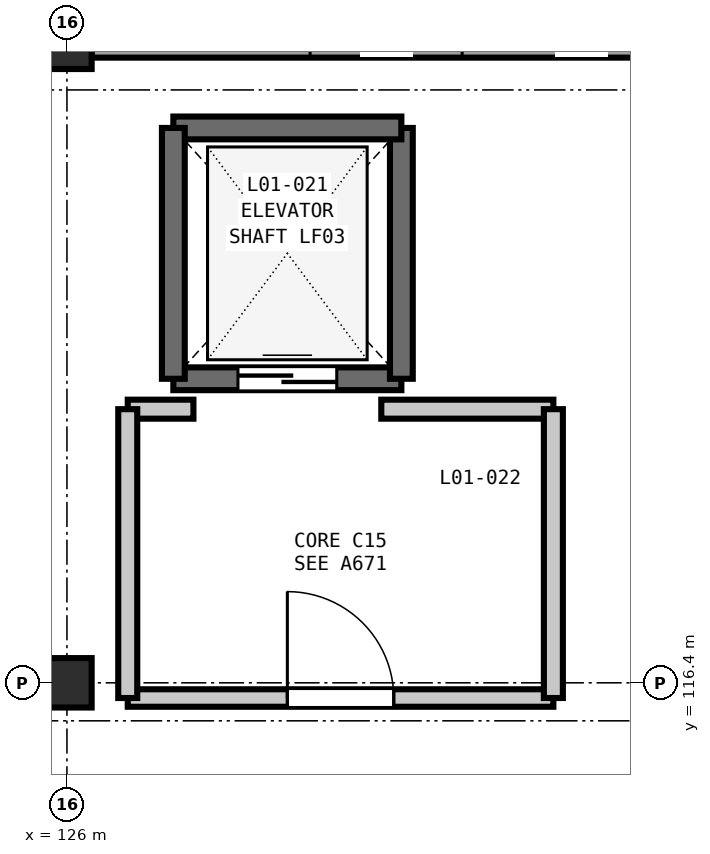
"""IFC4 building model, lengths in metres.
Left out: names, types, materials, properties, quantities, classifications, styles, units other than length and angle.
Written with IfcOpenShell. Run it as: python <this file> out.ifc"""

import sys

from ifc_helpers import new_model, si_unit, direction, frame, frame_2d, origin, origin_2d, place, context, subcontext, project, spatial, rectangle, extrude, element, fill, save


model = new_model("IFC4")
c1 = context("Model", 3, precision=1e-05, world=origin(), true_north=direction((0.0, 1.0)))
c2 = subcontext(c1, "Body", "Model", "MODEL_VIEW")
j1 = project(units=[si_unit("LENGTHUNIT", "METRE"), si_unit("PLANEANGLEUNIT", "RADIAN")], contexts=[c1])
p1 = place(None, origin())
s1 = spatial("IfcSite", under=j1, at=p1, CompositionType="ELEMENT")
p2 = place(p1, origin())
s2 = spatial("IfcBuilding", under=s1, at=p2, CompositionType="ELEMENT")
p3 = place(p2, frame((0.0, 0.0, 5.4)))
s3 = spatial("IfcBuildingStorey", under=s2, at=p3, CompositionType="ELEMENT", Elevation=5.4)
for number, where, z_axis, x_axis in (
    (1, (126.0, 116.4, 0.0), (0.0, 0.0, 1.0), (1.0, 0.0, 0.0)),
    (2, (126.0, 124.8, 0.0), (0.0, 0.0, 1.0), (1.0, 0.0, 0.0)),
):
    element("IfcColumn", number, at=place(p3, frame(where, z_axis=z_axis, x_axis=x_axis)), inside=s3, PredefinedType="COLUMN", context=c2, shape_type="SweptSolid", body=[
        extrude(rectangle(XDim=0.65, YDim=0.65, at=origin_2d()), origin(), (0.0, 0.0, 1.0), 5.4),
    ])
p4 = place(p3, frame((126.323, 124.8, 0.0), z_axis=(0.0, 0.0, 1.0), x_axis=(1.0, 0.0, 0.0)))
e3 = element("IfcWall", 3, at=p4, inside=s3, PredefinedType="SOLIDWALL", context=c2, shape_type="SweptSolid", body=[
    extrude(rectangle(XDim=7.754, YDim=0.35, at=frame_2d((3.877, 0.0))), origin(), (0.0, 0.0, 1.0), 4.68),
])
p5 = place(p4, frame((2.877, 0.0, 0.9)))
e4 = element("IfcOpeningElement", 4, at=p5, cuts=e3, PredefinedType="OPENING", context=c2, shape_type="SweptSolid", body=[
    extrude(rectangle(XDim=2.0, YDim=1.95, at=frame_2d((1.0, 0.975))), frame((0.0, 0.185, 0.0), z_axis=(0.0, -1.0, 0.0), x_axis=(1.0, 0.0, 0.0)), (0.0, 0.0, 1.0), 0.37),
])
p6 = place(p3, frame((127.4, 120.4, 0.0), z_axis=(0.0, 0.0, 1.0), x_axis=(1.0, 0.0, 0.0)))
e5 = element("IfcWall", 5, at=p6, inside=s3, PredefinedType="SHEAR", context=c2, shape_type="SweptSolid", body=[
    extrude(rectangle(XDim=3.0, YDim=0.3, at=frame_2d((1.5, 0.0))), origin(), (0.0, 0.0, 1.0), 5.4),
])
p7 = place(p6, frame((0.85, 0.0, 0.0)))
e6 = element("IfcOpeningElement", 6, at=p7, cuts=e5, PredefinedType="OPENING", context=c2, shape_type="SweptSolid", body=[
    extrude(rectangle(XDim=1.3, YDim=2.2, at=frame_2d((0.65, 1.1))), frame((0.0, 0.16, 0.0), z_axis=(0.0, -1.0, 0.0), x_axis=(1.0, 0.0, 0.0)), (0.0, 0.0, 1.0), 0.32),
])
p8 = place(p3, frame((130.4, 120.4, 0.0), z_axis=(0.0, 0.0, 1.0), x_axis=(0.0, 1.0, 0.0)))
e7 = element("IfcWall", 7, at=p8, inside=s3, PredefinedType="SHEAR", context=c2, shape_type="SweptSolid", body=[
    extrude(rectangle(XDim=3.3, YDim=0.3, at=frame_2d((1.65, 0.0))), origin(), (0.0, 0.0, 1.0), 5.4),
])
p9 = place(p3, frame((130.4, 123.7, 0.0), z_axis=(0.0, 0.0, 1.0), x_axis=(-1.0, 0.0, 0.0)))
e8 = element("IfcWall", 8, at=p9, inside=s3, PredefinedType="SHEAR", context=c2, shape_type="SweptSolid", body=[
    extrude(rectangle(XDim=3.0, YDim=0.3, at=frame_2d((1.5, 0.0))), origin(), (0.0, 0.0, 1.0), 5.4),
])
p10 = place(p3, frame((127.4, 123.7, 0.0), z_axis=(0.0, 0.0, 1.0), x_axis=(0.0, -1.0, 0.0)))
e9 = element("IfcWall", 9, at=p10, inside=s3, PredefinedType="SHEAR", context=c2, shape_type="SweptSolid", body=[
    extrude(rectangle(XDim=3.3, YDim=0.3, at=frame_2d((1.65, 0.0))), origin(), (0.0, 0.0, 1.0), 5.4),
])
p11 = place(p3, frame((126.8, 116.2, 0.0), z_axis=(0.0, 0.0, 1.0), x_axis=(1.0, 0.0, 0.0)))
e10 = element("IfcWall", 10, at=p11, inside=s3, PredefinedType="PARTITIONING", context=c2, shape_type="SweptSolid", body=[
    extrude(rectangle(XDim=5.6, YDim=0.23, at=frame_2d((2.8, 0.0))), origin(), (0.0, 0.0, 1.0), 4.685),
])
p12 = place(p11, frame((2.1, 0.0, 0.0)))
e11 = element("IfcOpeningElement", 11, at=p12, cuts=e10, PredefinedType="OPENING", context=c2, shape_type="SweptSolid", body=[
    extrude(rectangle(XDim=1.4, YDim=2.2, at=frame_2d((0.7, 1.1))), frame((0.0, 0.125, 0.0), z_axis=(0.0, -1.0, 0.0), x_axis=(1.0, 0.0, 0.0)), (0.0, 0.0, 1.0), 0.25),
])
p13 = place(p3, frame((130.136, 120.0, 0.0), z_axis=(0.0, 0.0, 1.0), x_axis=(1.0, 0.0, 0.0)))
e12 = element("IfcWall", 12, at=p13, inside=s3, PredefinedType="PARTITIONING", context=c2, shape_type="SweptSolid", body=[
    extrude(rectangle(XDim=2.264, YDim=0.25, at=frame_2d((1.132, 0.0))), origin(), (0.0, 0.0, 1.0), 5.05),
])
p14 = place(p3, frame((126.8, 120.0, 0.0), z_axis=(0.0, 0.0, 1.0), x_axis=(1.0, 0.0, 0.0)))
e13 = element("IfcWall", 13, at=p14, inside=s3, PredefinedType="PARTITIONING", context=c2, shape_type="SweptSolid", body=[
    extrude(rectangle(XDim=0.864, YDim=0.25, at=frame_2d((0.432, 0.0))), origin(), (0.0, 0.0, 1.0), 5.05),
])
for number, where, z_axis, x_axis in (
    (14, (126.8, 116.2, 0.0), (0.0, 0.0, 1.0), (0.0, 1.0, 0.0)),
    (15, (132.4, 116.2, 0.0), (0.0, 0.0, 1.0), (0.0, 1.0, 0.0)),
):
    element("IfcWall", number, at=place(p3, frame(where, z_axis=z_axis, x_axis=x_axis)), inside=s3, PredefinedType="PARTITIONING", context=c2, shape_type="SweptSolid", body=[
        extrude(rectangle(XDim=3.8, YDim=0.25, at=frame_2d((1.9, 0.0))), origin(), (0.0, 0.0, 1.0), 5.05),
    ])
p15 = place(p7, origin())
e16 = element("IfcDoor", 16, at=p15, inside=s3, OperationType="DOUBLE_DOOR_SLIDING", PredefinedType="DOOR", context=c2, shape_type="SweptSolid", body=[
    extrude(rectangle(XDim=1.3, YDim=2.2, at=frame_2d((0.65, 1.1))), frame((0.0, 0.025, 0.0), z_axis=(0.0, -1.0, 0.0), x_axis=(1.0, 0.0, 0.0)), (0.0, 0.0, 1.0), 0.05),
])
fill(e6, e16)
p16 = place(p12, origin())
e17 = element("IfcDoor", 17, at=p16, inside=s3, OperationType="SINGLE_SWING_LEFT", PredefinedType="DOOR", context=c2, shape_type="SweptSolid", body=[
    extrude(rectangle(XDim=1.4, YDim=2.2, at=frame_2d((0.7, 1.1))), frame((0.0, 0.025, 0.0), z_axis=(0.0, -1.0, 0.0), x_axis=(1.0, 0.0, 0.0)), (0.0, 0.0, 1.0), 0.05),
])
fill(e11, e17)
save(model, sys.argv[1])
